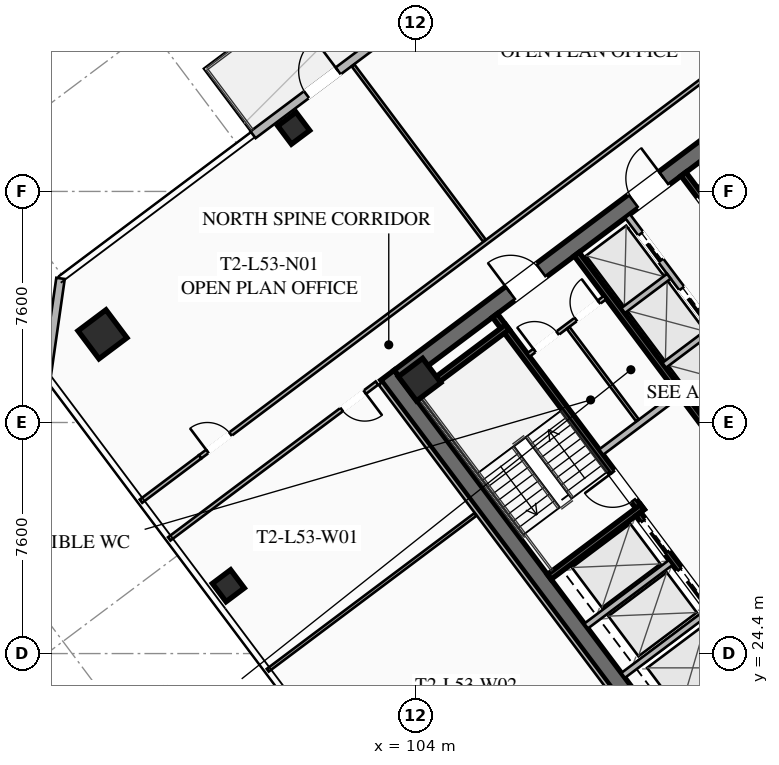
"""IFC4 building model, lengths in metres.
Left out: names, types, materials, properties, quantities, classifications, styles, units other than length and angle.
Written with IfcOpenShell. Run it as: python <this file> out.ifc"""

import sys

from ifc_helpers import new_model, si_unit, direction, frame, frame_2d, origin, origin_2d, place, context, subcontext, project, spatial, rectangle, hollow_rectangle, extrude, element, fill, save


model = new_model("IFC4")
c1 = context("Model", 3, precision=1e-05, world=origin(), true_north=direction((0.0, 1.0)))
c2 = subcontext(c1, "Body", "Model", "MODEL_VIEW")
j1 = project(units=[si_unit("LENGTHUNIT", "METRE"), si_unit("PLANEANGLEUNIT", "RADIAN")], contexts=[c1])
p1 = place(None, origin())
s1 = spatial("IfcSite", under=j1, at=p1, CompositionType="ELEMENT")
p2 = place(p1, origin())
s2 = spatial("IfcBuilding", under=s1, at=p2, CompositionType="ELEMENT")
p3 = place(p2, frame((0.0, 0.0, 196.05)))
s3 = spatial("IfcBuildingStorey", under=s2, at=p3, CompositionType="ELEMENT", Elevation=196.05)
p4 = place(p3, frame((112.436, 21.077, 0.0), z_axis=(0.0, 0.0, 1.0), x_axis=(-0.600005007985, 0.799996243986, 0.0)))
e1 = element("IfcWall", 1, at=p4, inside=s3, PredefinedType="SHEAR", context=c2, shape_type="SweptSolid", body=[
    extrude(rectangle(XDim=15.6, YDim=0.55, at=frame_2d((7.8, 0.0))), origin(), (0.0, 0.0, 1.0), 3.55),
])
p5 = place(p3, frame((124.539, 30.498, 0.0), z_axis=(0.0, 0.0, 1.0), x_axis=(-0.799998054672, -0.600002593761, 0.0)))
e2 = element("IfcWall", 2, at=p5, inside=s3, PredefinedType="SHEAR", context=c2, shape_type="SweptSolid", body=[
    extrude(rectangle(XDim=15.06, YDim=0.55, at=frame_2d((7.53, 0.0))), origin(), (0.0, 0.0, 1.0), 3.55),
])
p6 = place(p5, frame((9.23, 0.0, 0.0)))
e3 = element("IfcOpeningElement", 3, at=p6, cuts=e2, PredefinedType="OPENING", context=c2, shape_type="SweptSolid", body=[
    extrude(rectangle(XDim=1.25, YDim=2.25, at=frame_2d((0.625, 1.125))), frame((0.0, 0.285, 0.0), z_axis=(0.0, -1.0, 0.0), x_axis=(1.0, 0.0, 0.0)), (0.0, 0.0, 1.0), 0.57),
])
p7 = place(p5, frame((4.18, 0.0, 0.0)))
e4 = element("IfcOpeningElement", 4, at=p7, cuts=e2, PredefinedType="OPENING", context=c2, shape_type="SweptSolid", body=[
    extrude(rectangle(XDim=1.25, YDim=2.25, at=frame_2d((0.625, 1.125))), frame((0.0, 0.285, 0.0), z_axis=(0.0, -1.0, 0.0), x_axis=(1.0, 0.0, 0.0)), (0.0, 0.0, 1.0), 0.57),
])
p8 = place(p3, frame((103.461, 33.502, 0.0), z_axis=(0.0, 0.0, 1.0), x_axis=(0.799998054672, 0.600002593761, 0.0)))
e5 = element("IfcWall", 5, at=p8, inside=s3, PredefinedType="SHEAR", context=c2, shape_type="SweptSolid", body=[
    extrude(rectangle(XDim=15.06, YDim=0.55, at=frame_2d((7.53, 0.0))), origin(), (0.0, 0.0, 1.0), 3.55),
])
p9 = place(p8, frame((4.58, 0.0, 0.0)))
e6 = element("IfcOpeningElement", 6, at=p9, cuts=e5, PredefinedType="OPENING", context=c2, shape_type="SweptSolid", body=[
    extrude(rectangle(XDim=1.25, YDim=2.25, at=frame_2d((0.625, 1.125))), frame((0.0, 0.285, 0.0), z_axis=(0.0, -1.0, 0.0), x_axis=(1.0, 0.0, 0.0)), (0.0, 0.0, 1.0), 0.57),
])
p10 = place(p8, frame((9.63, 0.0, 0.0)))
e7 = element("IfcOpeningElement", 7, at=p10, cuts=e5, PredefinedType="OPENING", context=c2, shape_type="SweptSolid", body=[
    extrude(rectangle(XDim=1.25, YDim=2.25, at=frame_2d((0.625, 1.125))), frame((0.0, 0.285, 0.0), z_axis=(0.0, -1.0, 0.0), x_axis=(1.0, 0.0, 0.0)), (0.0, 0.0, 1.0), 0.57),
])
p11 = place(p3, frame((104.13, 33.41, 0.0), z_axis=(0.0, 0.0, 1.0), x_axis=(0.799999996291, 0.600000004945, 0.0)))
e8 = element("IfcColumn", 8, at=p11, inside=s3, PredefinedType="COLUMN", context=c2, shape_type="SweptSolid", body=[
    extrude(hollow_rectangle(XDim=1.0, YDim=1.0, WallThickness=0.04, at=origin_2d()), origin(), (0.0, 0.0, 1.0), 3.25),
])
p12 = place(p3, frame((93.7, 34.9, 0.0), z_axis=(0.0, 0.0, 1.0), x_axis=(0.799999996291, 0.600000004945, 0.0)))
e9 = element("IfcColumn", 9, at=p12, inside=s3, PredefinedType="COLUMN", context=c2, shape_type="SweptSolid", body=[
    extrude(hollow_rectangle(XDim=1.15, YDim=1.15, WallThickness=0.045, at=origin_2d()), origin(), (0.0, 0.0, 1.0), 3.25),
])
for number, where, z_axis, x_axis in (
    (10, (99.99, 41.68, 0.0), (0.0, 0.0, 1.0), (0.8, 0.6, 0.0)),
    (11, (97.84, 26.63, 0.0), (0.0, 0.0, 1.0), (0.8, 0.6, 0.0)),
):
    element("IfcColumn", number, at=place(p3, frame(where, z_axis=z_axis, x_axis=x_axis)), inside=s3, PredefinedType="COLUMN", context=c2, shape_type="SweptSolid", body=[
        extrude(hollow_rectangle(XDim=0.75, YDim=0.75, WallThickness=0.032, at=origin_2d()), origin(), (0.0, 0.0, 1.0), 3.25),
    ])
p13 = place(p3, frame((98.652, 41.464, 0.0), z_axis=(0.0, 0.0, 1.0), x_axis=(0.799997780501, 0.60000295932, 0.0)))
e12 = element("IfcWall", 12, at=p13, inside=s3, PredefinedType="SOLIDWALL", context=c2, shape_type="SweptSolid", body=[
    extrude(rectangle(XDim=13.2, YDim=0.28, at=frame_2d((6.6, 0.0))), origin(), (0.0, 0.0, 1.0), 3.25),
])
p14 = place(p13, frame((2.2, 0.0, 0.0)))
e13 = element("IfcOpeningElement", 13, at=p14, cuts=e12, PredefinedType="OPENING", context=c2, shape_type="SweptSolid", body=[
    extrude(rectangle(XDim=1.3, YDim=2.15, at=frame_2d((0.65, 1.075))), frame((0.0, 0.15, 0.0), z_axis=(0.0, -1.0, 0.0), x_axis=(1.0, 0.0, 0.0)), (0.0, 0.0, 1.0), 0.3),
])
p15 = place(p13, frame((9.182, 0.0, 0.85)))
e14 = element("IfcOpeningElement", 14, at=p15, cuts=e12, PredefinedType="OPENING", context=c2, shape_type="SweptSolid", body=[
    extrude(rectangle(XDim=1.8, YDim=1.92, at=frame_2d((0.9, 0.96))), frame((0.0, 0.15, 0.0), z_axis=(0.0, -1.0, 0.0), x_axis=(1.0, 0.0, 0.0)), (0.0, 0.0, 1.0), 0.3),
])
p16 = place(p3, frame((91.86, 33.52, 0.0), z_axis=(0.0, 0.0, 1.0), x_axis=(0.141410847992, 0.989950994782, 0.0)))
e15 = element("IfcWall", 15, at=p16, inside=s3, PredefinedType="SOLIDWALL", context=c2, shape_type="SweptSolid", body=[
    extrude(rectangle(XDim=3.253, YDim=0.28, at=frame_2d((1.626, 0.0))), origin(), (0.0, 0.0, 1.0), 3.25),
])
p17 = place(p3, frame((111.44, 29.08, 0.0), z_axis=(0.0, 0.0, 1.0), x_axis=(-0.59999029481, 0.8000072788, 0.0)))
e16 = element("IfcWall", 16, at=p17, inside=s3, PredefinedType="SHEAR", context=c2, shape_type="SweptSolid", body=[
    extrude(rectangle(XDim=8.05, YDim=0.2, at=frame_2d((4.025, 0.0))), origin(), (0.0, 0.0, 1.0), 3.25),
])
p18 = place(p17, frame((0.45, 0.0, 0.0)))
e17 = element("IfcOpeningElement", 17, at=p18, cuts=e16, PredefinedType="OPENING", context=c2, shape_type="SweptSolid", body=[
    extrude(rectangle(XDim=1.15, YDim=2.2, at=frame_2d((0.575, 1.1))), frame((0.0, 0.11, 0.0), z_axis=(0.0, -1.0, 0.0), x_axis=(1.0, 0.0, 0.0)), (0.0, 0.0, 1.0), 0.22),
])
for number, where, z_axis, x_axis in (
    (18, (108.396, 26.922, 0.0), (0.0, 0.0, 1.0), (0.8, 0.6, 0.0)),
    (19, (103.956, 32.842, 0.0), (0.0, 0.0, 1.0), (0.8, 0.6, 0.0)),
):
    element("IfcWall", number, at=place(p3, frame(where, z_axis=z_axis, x_axis=x_axis)), inside=s3, PredefinedType="SHEAR", context=c2, shape_type="SweptSolid", body=[
        extrude(rectangle(XDim=3.83, YDim=0.2, at=frame_2d((1.915, 0.0))), origin(), (0.0, 0.0, 1.0), 3.25),
    ])
p19 = place(p3, frame((117.998, 25.936, 0.0), z_axis=(0.0, 0.0, 1.0), x_axis=(-0.600002693989, 0.799997979501, 0.0)))
e20 = element("IfcWall", 20, at=p19, inside=s3, PredefinedType="SHEAR", context=c2, shape_type="SweptSolid", body=[
    extrude(rectangle(XDim=14.5, YDim=0.2, at=frame_2d((7.25, 0.0))), origin(), (0.0, 0.0, 1.0), 3.25),
])
p20 = place(p3, frame((110.104, 31.028, 0.0), z_axis=(0.0, 0.0, 1.0), x_axis=(0.800018601094, 0.59997519774, 0.0)))
e21 = element("IfcWall", 21, at=p20, inside=s3, PredefinedType="SOLIDWALL", context=c2, shape_type="SweptSolid", body=[
    extrude(rectangle(XDim=3.15, YDim=0.22, at=frame_2d((1.575, 0.0))), origin(), (0.0, 0.0, 1.0), 2.393),
])
p21 = place(p3, frame((115.19, 23.83, 0.0), z_axis=(0.0, 0.0, 1.0), x_axis=(-0.599993943644, 0.800004542231, 0.0)))
e22 = element("IfcWall", 22, at=p21, inside=s3, PredefinedType="SHEAR", context=c2, shape_type="SweptSolid", body=[
    extrude(rectangle(XDim=6.45, YDim=0.2, at=frame_2d((3.225, 0.0))), origin(), (0.0, 0.0, 1.0), 3.25),
])
p22 = place(p21, frame((4.875, 0.0, 0.0)))
e23 = element("IfcOpeningElement", 23, at=p22, cuts=e22, PredefinedType="OPENING", context=c2, shape_type="SweptSolid", body=[
    extrude(rectangle(XDim=1.3, YDim=2.25, at=frame_2d((0.65, 1.125))), frame((0.0, 0.11, 0.0), z_axis=(0.0, -1.0, 0.0), x_axis=(1.0, 0.0, 0.0)), (0.0, 0.0, 1.0), 0.22),
])
p23 = place(p21, frame((2.875, 0.0, 0.0)))
e24 = element("IfcOpeningElement", 24, at=p23, cuts=e22, PredefinedType="OPENING", context=c2, shape_type="SweptSolid", body=[
    extrude(rectangle(XDim=1.3, YDim=2.25, at=frame_2d((0.65, 1.125))), frame((0.0, 0.11, 0.0), z_axis=(0.0, -1.0, 0.0), x_axis=(1.0, 0.0, 0.0)), (0.0, 0.0, 1.0), 0.22),
])
p24 = place(p21, frame((0.675, 0.0, 0.0)))
e25 = element("IfcOpeningElement", 25, at=p24, cuts=e22, PredefinedType="OPENING", context=c2, shape_type="SweptSolid", body=[
    extrude(rectangle(XDim=1.3, YDim=2.25, at=frame_2d((0.65, 1.125))), frame((0.0, 0.11, 0.0), z_axis=(0.0, -1.0, 0.0), x_axis=(1.0, 0.0, 0.0)), (0.0, 0.0, 1.0), 0.22),
])
for number, where, z_axis, x_axis in (
    (26, (110.826, 23.682, 0.0), (0.0, 0.0, 1.0), (0.8, 0.6, 0.0)),
    (27, (109.608, 25.306, 0.0), (0.0, 0.0, 1.0), (0.8, 0.6, 0.0)),
):
    element("IfcWall", number, at=place(p3, frame(where, z_axis=z_axis, x_axis=x_axis)), inside=s3, PredefinedType="SOLIDWALL", context=c2, shape_type="SweptSolid", body=[
        extrude(rectangle(XDim=3.48, YDim=0.2, at=frame_2d((1.74, 0.0))), origin(), (0.0, 0.0, 1.0), 3.25),
    ])
p25 = place(p3, frame((112.81, 40.17, 0.0), z_axis=(0.0, 0.0, 1.0), x_axis=(0.599993943644, -0.800004542231, 0.0)))
e28 = element("IfcWall", 28, at=p25, inside=s3, PredefinedType="SHEAR", context=c2, shape_type="SweptSolid", body=[
    extrude(rectangle(XDim=6.45, YDim=0.2, at=frame_2d((3.225, 0.0))), origin(), (0.0, 0.0, 1.0), 3.25),
])
p26 = place(p25, frame((4.975, 0.0, 0.0)))
e29 = element("IfcOpeningElement", 29, at=p26, cuts=e28, PredefinedType="OPENING", context=c2, shape_type="SweptSolid", body=[
    extrude(rectangle(XDim=1.1, YDim=2.2, at=frame_2d((0.55, 1.1))), frame((0.0, 0.11, 0.0), z_axis=(0.0, -1.0, 0.0), x_axis=(1.0, 0.0, 0.0)), (0.0, 0.0, 1.0), 0.22),
])
p27 = place(p25, frame((2.925, 0.0, 0.0)))
e30 = element("IfcOpeningElement", 30, at=p27, cuts=e28, PredefinedType="OPENING", context=c2, shape_type="SweptSolid", body=[
    extrude(rectangle(XDim=1.1, YDim=2.2, at=frame_2d((0.55, 1.1))), frame((0.0, 0.11, 0.0), z_axis=(0.0, -1.0, 0.0), x_axis=(1.0, 0.0, 0.0)), (0.0, 0.0, 1.0), 0.22),
])
p28 = place(p25, frame((0.925, 0.0, 0.0)))
e31 = element("IfcOpeningElement", 31, at=p28, cuts=e28, PredefinedType="OPENING", context=c2, shape_type="SweptSolid", body=[
    extrude(rectangle(XDim=1.1, YDim=2.2, at=frame_2d((0.55, 1.1))), frame((0.0, 0.11, 0.0), z_axis=(0.0, -1.0, 0.0), x_axis=(1.0, 0.0, 0.0)), (0.0, 0.0, 1.0), 0.22),
])
p29 = place(p3, frame((107.71, 34.22, 0.0), z_axis=(0.0, 0.0, 1.0), x_axis=(0.799981399002, 0.60002480053, 0.0)))
e32 = element("IfcWall", 32, at=p29, inside=s3, PredefinedType="PARTITIONING", context=c2, shape_type="SweptSolid", body=[
    extrude(rectangle(XDim=3.15, YDim=0.135, at=frame_2d((1.575, 0.0))), origin(), (0.0, 0.0, 1.0), 2.393),
])
p30 = place(p29, frame((0.25, 0.0, 0.0)))
e33 = element("IfcOpeningElement", 33, at=p30, cuts=e32, PredefinedType="OPENING", context=c2, shape_type="SweptSolid", body=[
    extrude(rectangle(XDim=0.95, YDim=2.05, at=frame_2d((0.475, 1.025))), frame((0.0, 0.077, 0.0), z_axis=(0.0, -1.0, 0.0), x_axis=(1.0, 0.0, 0.0)), (0.0, 0.0, 1.0), 0.155),
])
p31 = place(p29, frame((1.95, 0.0, 0.0)))
e34 = element("IfcOpeningElement", 34, at=p31, cuts=e32, PredefinedType="OPENING", context=c2, shape_type="SweptSolid", body=[
    extrude(rectangle(XDim=0.95, YDim=2.05, at=frame_2d((0.475, 1.025))), frame((0.0, 0.077, 0.0), z_axis=(0.0, -1.0, 0.0), x_axis=(1.0, 0.0, 0.0)), (0.0, 0.0, 1.0), 0.155),
])
p32 = place(p3, frame((111.296, 32.072, 0.0), z_axis=(0.0, 0.0, 1.0), x_axis=(-0.59995887973, 0.800030838552, 0.0)))
e35 = element("IfcWall", 35, at=p32, inside=s3, PredefinedType="PARTITIONING", context=c2, shape_type="SweptSolid", body=[
    extrude(rectangle(XDim=3.8, YDim=0.11, at=frame_2d((1.9, 0.0))), origin(), (0.0, 0.0, 1.0), 2.393),
])
p33 = place(p3, frame((115.11, 33.27, 0.0), z_axis=(0.0, 0.0, 1.0), x_axis=(-0.600011322243, 0.799991508192, 0.0)))
e36 = element("IfcWall", 36, at=p33, inside=s3, PredefinedType="SOLIDWALL", context=c2, shape_type="SweptSolid", body=[
    extrude(rectangle(XDim=6.9, YDim=0.2, at=frame_2d((3.45, 0.0))), origin(), (0.0, 0.0, 1.0), 3.25),
])
p34 = place(p33, frame((0.575, 0.0, 0.0)))
e37 = element("IfcOpeningElement", 37, at=p34, cuts=e36, PredefinedType="OPENING", context=c2, shape_type="SweptSolid", body=[
    extrude(rectangle(XDim=1.1, YDim=2.2, at=frame_2d((0.55, 1.1))), frame((0.0, 0.11, 0.0), z_axis=(0.0, -1.0, 0.0), x_axis=(1.0, 0.0, 0.0)), (0.0, 0.0, 1.0), 0.22),
])
p35 = place(p33, frame((2.825, 0.0, 0.0)))
e38 = element("IfcOpeningElement", 38, at=p35, cuts=e36, PredefinedType="OPENING", context=c2, shape_type="SweptSolid", body=[
    extrude(rectangle(XDim=1.1, YDim=2.2, at=frame_2d((0.55, 1.1))), frame((0.0, 0.11, 0.0), z_axis=(0.0, -1.0, 0.0), x_axis=(1.0, 0.0, 0.0)), (0.0, 0.0, 1.0), 0.22),
])
p36 = place(p33, frame((5.075, 0.0, 0.0)))
e39 = element("IfcOpeningElement", 39, at=p36, cuts=e36, PredefinedType="OPENING", context=c2, shape_type="SweptSolid", body=[
    extrude(rectangle(XDim=1.1, YDim=2.2, at=frame_2d((0.55, 1.1))), frame((0.0, 0.11, 0.0), z_axis=(0.0, -1.0, 0.0), x_axis=(1.0, 0.0, 0.0)), (0.0, 0.0, 1.0), 0.22),
])
p37 = place(p3, frame((112.176, 33.882, 0.0), z_axis=(0.0, 0.0, 1.0), x_axis=(0.8, 0.6, 0.0)))
e40 = element("IfcWall", 40, at=p37, inside=s3, PredefinedType="SOLIDWALL", context=c2, shape_type="SweptSolid", body=[
    extrude(rectangle(XDim=1.88, YDim=0.2, at=frame_2d((0.94, 0.0))), origin(), (0.0, 0.0, 1.0), 3.25),
])
p38 = place(p3, frame((110.826, 35.682, 0.0), z_axis=(0.0, 0.0, 1.0), x_axis=(0.799984418148, 0.600020775241, 0.0)))
e41 = element("IfcWall", 41, at=p38, inside=s3, PredefinedType="SOLIDWALL", context=c2, shape_type="SweptSolid", body=[
    extrude(rectangle(XDim=1.88, YDim=0.2, at=frame_2d((0.94, 0.0))), origin(), (0.0, 0.0, 1.0), 3.25),
])
p39 = place(p3, frame((96.91, 30.87, 0.0), z_axis=(0.0, 0.0, 1.0), x_axis=(0.800003062365, 0.599995916825, 0.0)))
e42 = element("IfcWall", 42, at=p39, inside=s3, PredefinedType="PARTITIONING", context=c2, shape_type="SweptSolid", body=[
    extrude(rectangle(XDim=28.7, YDim=0.135, at=frame_2d((14.35, 0.0))), origin(), (0.0, 0.0, 1.0), 2.393),
])
p40 = place(p39, frame((0.3, 0.0, 0.0)))
e43 = element("IfcOpeningElement", 43, at=p40, cuts=e42, PredefinedType="OPENING", context=c2, shape_type="SweptSolid", body=[
    extrude(rectangle(XDim=0.95, YDim=2.05, at=frame_2d((0.475, 1.025))), frame((0.0, 0.077, 0.0), z_axis=(0.0, -1.0, 0.0), x_axis=(1.0, 0.0, 0.0)), (0.0, 0.0, 1.0), 0.155),
])
p41 = place(p39, frame((27.45, 0.0, 0.0)))
e44 = element("IfcOpeningElement", 44, at=p41, cuts=e42, PredefinedType="OPENING", context=c2, shape_type="SweptSolid", body=[
    extrude(rectangle(XDim=0.95, YDim=2.05, at=frame_2d((0.475, 1.025))), frame((0.0, 0.077, 0.0), z_axis=(0.0, -1.0, 0.0), x_axis=(1.0, 0.0, 0.0)), (0.0, 0.0, 1.0), 0.155),
])
p42 = place(p3, frame((94.966, 29.412, 0.0), z_axis=(0.0, 0.0, 1.0), x_axis=(0.799975885537, 0.600032151272, 0.0)))
e45 = element("IfcWall", 45, at=p42, inside=s3, PredefinedType="PARTITIONING", context=c2, shape_type="SweptSolid", body=[
    extrude(rectangle(XDim=2.43, YDim=0.135, at=frame_2d((1.215, 0.0))), origin(), (0.0, 0.0, 1.0), 2.393),
])
p43 = place(p3, frame((106.262, 37.984, 0.0), z_axis=(0.0, 0.0, 1.0), x_axis=(-0.600005425297, 0.799995930999, 0.0)))
e46 = element("IfcWall", 46, at=p43, inside=s3, PredefinedType="PARTITIONING", context=c2, shape_type="SweptSolid", body=[
    extrude(rectangle(XDim=7.2, YDim=0.11, at=frame_2d((3.6, 0.0))), origin(), (0.0, 0.0, 1.0), 2.393),
])
p44 = place(p3, frame((131.282, 32.874, 0.0), z_axis=(0.0, 0.0, 1.0), x_axis=(-0.8, -0.6, 0.0)))
e47 = element("IfcWall", 47, at=p44, inside=s3, PredefinedType="PARTITIONING", context=c2, shape_type="SweptSolid", body=[
    extrude(rectangle(XDim=28.7, YDim=0.135, at=frame_2d((14.35, 0.0))), origin(), (0.0, 0.0, 1.0), 2.393),
])
p45 = place(p44, frame((27.37, 0.0, 0.0)))
e48 = element("IfcOpeningElement", 48, at=p45, cuts=e47, PredefinedType="OPENING", context=c2, shape_type="SweptSolid", body=[
    extrude(rectangle(XDim=0.95, YDim=2.05, at=frame_2d((0.475, 1.025))), frame((0.0, 0.077, 0.0), z_axis=(0.0, -1.0, 0.0), x_axis=(1.0, 0.0, 0.0)), (0.0, 0.0, 1.0), 0.155),
])
p46 = place(p44, frame((0.38, 0.0, 0.0)))
e49 = element("IfcOpeningElement", 49, at=p46, cuts=e47, PredefinedType="OPENING", context=c2, shape_type="SweptSolid", body=[
    extrude(rectangle(XDim=0.95, YDim=2.05, at=frame_2d((0.475, 1.025))), frame((0.0, 0.077, 0.0), z_axis=(0.0, -1.0, 0.0), x_axis=(1.0, 0.0, 0.0)), (0.0, 0.0, 1.0), 0.155),
])
p47 = place(p3, frame((112.104, 20.928, 0.0), z_axis=(0.0, 0.0, 1.0), x_axis=(-0.599994940075, 0.800003794918, 0.0)))
e50 = element("IfcWall", 50, at=p47, inside=s3, PredefinedType="PARTITIONING", context=c2, shape_type="SweptSolid", body=[
    extrude(rectangle(XDim=15.44, YDim=0.135, at=frame_2d((7.72, 0.0))), origin(), (0.0, 0.0, 1.0), 2.393),
])
p48 = place(p3, frame((102.728, 33.296, 0.0), z_axis=(0.0, 0.0, 1.0), x_axis=(-0.800013722153, -0.59998170336, 0.0)))
e51 = element("IfcWall", 51, at=p48, inside=s3, PredefinedType="PARTITIONING", context=c2, shape_type="SweptSolid", body=[
    extrude(rectangle(XDim=8.54, YDim=0.135, at=frame_2d((4.27, 0.0))), origin(), (0.0, 0.0, 1.0), 2.393),
])
p49 = place(p48, frame((0.5, 0.0, 0.0)))
e52 = element("IfcOpeningElement", 52, at=p49, cuts=e51, PredefinedType="OPENING", context=c2, shape_type="SweptSolid", body=[
    extrude(rectangle(XDim=0.95, YDim=2.05, at=frame_2d((0.475, 1.025))), frame((0.0, 0.077, 0.0), z_axis=(0.0, -1.0, 0.0), x_axis=(1.0, 0.0, 0.0)), (0.0, 0.0, 1.0), 0.155),
])
p50 = place(p3, frame((99.136, 23.852, 0.0), z_axis=(0.0, 0.0, 1.0), x_axis=(0.8, 0.6, 0.0)))
e53 = element("IfcWall", 53, at=p50, inside=s3, PredefinedType="PARTITIONING", context=c2, shape_type="SweptSolid", body=[
    extrude(rectangle(XDim=8.54, YDim=0.11, at=frame_2d((4.27, 0.0))), origin(), (0.0, 0.0, 1.0), 2.393),
])
p51 = place(p14, origin())
e54 = element("IfcDoor", 54, at=p51, inside=s3, OperationType="SINGLE_SWING_RIGHT", PredefinedType="DOOR", context=c2, shape_type="SweptSolid", body=[
    extrude(rectangle(XDim=1.3, YDim=2.15, at=frame_2d((0.65, 1.075))), frame((0.0, 0.025, 0.0), z_axis=(0.0, -1.0, 0.0), x_axis=(1.0, 0.0, 0.0)), (0.0, 0.0, 1.0), 0.05),
])
fill(e13, e54)
p52 = place(p9, origin())
e55 = element("IfcDoor", 55, at=p52, inside=s3, OperationType="SINGLE_SWING_LEFT", PredefinedType="DOOR", context=c2, shape_type="SweptSolid", body=[
    extrude(rectangle(XDim=1.25, YDim=2.25, at=frame_2d((0.625, 1.125))), frame((0.0, 0.025, 0.0), z_axis=(0.0, -1.0, 0.0), x_axis=(1.0, 0.0, 0.0)), (0.0, 0.0, 1.0), 0.05),
])
fill(e6, e55)
p53 = place(p10, origin())
e56 = element("IfcDoor", 56, at=p53, inside=s3, OperationType="SINGLE_SWING_RIGHT", PredefinedType="DOOR", context=c2, shape_type="SweptSolid", body=[
    extrude(rectangle(XDim=1.25, YDim=2.25, at=frame_2d((0.625, 1.125))), frame((0.0, 0.025, 0.0), z_axis=(0.0, -1.0, 0.0), x_axis=(1.0, 0.0, 0.0)), (0.0, 0.0, 1.0), 0.05),
])
fill(e7, e56)
p54 = place(p18, origin())
e57 = element("IfcDoor", 57, at=p54, inside=s3, OperationType="SINGLE_SWING_RIGHT", PredefinedType="DOOR", context=c2, shape_type="SweptSolid", body=[
    extrude(rectangle(XDim=1.15, YDim=2.2, at=frame_2d((0.575, 1.1))), frame((0.0, 0.025, 0.0), z_axis=(0.0, -1.0, 0.0), x_axis=(1.0, 0.0, 0.0)), (0.0, 0.0, 1.0), 0.05),
])
fill(e17, e57)
p55 = place(p30, origin())
e58 = element("IfcDoor", 58, at=p55, inside=s3, OperationType="SINGLE_SWING_LEFT", PredefinedType="DOOR", context=c2, shape_type="SweptSolid", body=[
    extrude(rectangle(XDim=0.95, YDim=2.05, at=frame_2d((0.475, 1.025))), frame((0.0, 0.025, 0.0), z_axis=(0.0, -1.0, 0.0), x_axis=(1.0, 0.0, 0.0)), (0.0, 0.0, 1.0), 0.05),
])
fill(e33, e58)
p56 = place(p31, origin())
e59 = element("IfcDoor", 59, at=p56, inside=s3, OperationType="SINGLE_SWING_RIGHT", PredefinedType="DOOR", context=c2, shape_type="SweptSolid", body=[
    extrude(rectangle(XDim=0.95, YDim=2.05, at=frame_2d((0.475, 1.025))), frame((0.0, 0.025, 0.0), z_axis=(0.0, -1.0, 0.0), x_axis=(1.0, 0.0, 0.0)), (0.0, 0.0, 1.0), 0.05),
])
fill(e34, e59)
p57 = place(p40, origin())
e60 = element("IfcDoor", 60, at=p57, inside=s3, OperationType="SINGLE_SWING_LEFT", PredefinedType="DOOR", context=c2, shape_type="SweptSolid", body=[
    extrude(rectangle(XDim=0.95, YDim=2.05, at=frame_2d((0.475, 1.025))), frame((0.0, 0.025, 0.0), z_axis=(0.0, -1.0, 0.0), x_axis=(1.0, 0.0, 0.0)), (0.0, 0.0, 1.0), 0.05),
])
fill(e43, e60)
p58 = place(p49, origin())
e61 = element("IfcDoor", 61, at=p58, inside=s3, OperationType="SINGLE_SWING_LEFT", PredefinedType="DOOR", context=c2, shape_type="SweptSolid", body=[
    extrude(rectangle(XDim=0.95, YDim=2.05, at=frame_2d((0.475, 1.025))), frame((0.0, 0.025, 0.0), z_axis=(0.0, -1.0, 0.0), x_axis=(1.0, 0.0, 0.0)), (0.0, 0.0, 1.0), 0.05),
])
fill(e52, e61)
p59 = place(p22, origin())
e62 = element("IfcDoor", 62, at=p59, inside=s3, OperationType="SLIDING_TO_LEFT", PredefinedType="DOOR", context=c2, shape_type="SweptSolid", body=[
    extrude(rectangle(XDim=1.3, YDim=2.25, at=frame_2d((0.65, 1.125))), frame((0.0, 0.025, 0.0), z_axis=(0.0, -1.0, 0.0), x_axis=(1.0, 0.0, 0.0)), (0.0, 0.0, 1.0), 0.05),
])
fill(e23, e62)
p60 = place(p23, origin())
e63 = element("IfcDoor", 63, at=p60, inside=s3, OperationType="SLIDING_TO_LEFT", PredefinedType="DOOR", context=c2, shape_type="SweptSolid", body=[
    extrude(rectangle(XDim=1.3, YDim=2.25, at=frame_2d((0.65, 1.125))), frame((0.0, 0.025, 0.0), z_axis=(0.0, -1.0, 0.0), x_axis=(1.0, 0.0, 0.0)), (0.0, 0.0, 1.0), 0.05),
])
fill(e24, e63)
p61 = place(p35, origin())
e64 = element("IfcDoor", 64, at=p61, inside=s3, OperationType="SLIDING_TO_LEFT", PredefinedType="DOOR", context=c2, shape_type="SweptSolid", body=[
    extrude(rectangle(XDim=1.1, YDim=2.2, at=frame_2d((0.55, 1.1))), frame((0.0, 0.025, 0.0), z_axis=(0.0, -1.0, 0.0), x_axis=(1.0, 0.0, 0.0)), (0.0, 0.0, 1.0), 0.05),
])
fill(e38, e64)
p62 = place(p36, origin())
e65 = element("IfcDoor", 65, at=p62, inside=s3, OperationType="SLIDING_TO_LEFT", PredefinedType="DOOR", context=c2, shape_type="SweptSolid", body=[
    extrude(rectangle(XDim=1.1, YDim=2.2, at=frame_2d((0.55, 1.1))), frame((0.0, 0.025, 0.0), z_axis=(0.0, -1.0, 0.0), x_axis=(1.0, 0.0, 0.0)), (0.0, 0.0, 1.0), 0.05),
])
fill(e39, e65)
p63 = place(p28, origin())
e66 = element("IfcDoor", 66, at=p63, inside=s3, OperationType="SLIDING_TO_LEFT", PredefinedType="DOOR", context=c2, shape_type="SweptSolid", body=[
    extrude(rectangle(XDim=1.1, YDim=2.2, at=frame_2d((0.55, 1.1))), frame((0.0, 0.025, 0.0), z_axis=(0.0, -1.0, 0.0), x_axis=(1.0, 0.0, 0.0)), (0.0, 0.0, 1.0), 0.05),
])
fill(e31, e66)
save(model, sys.argv[1])
